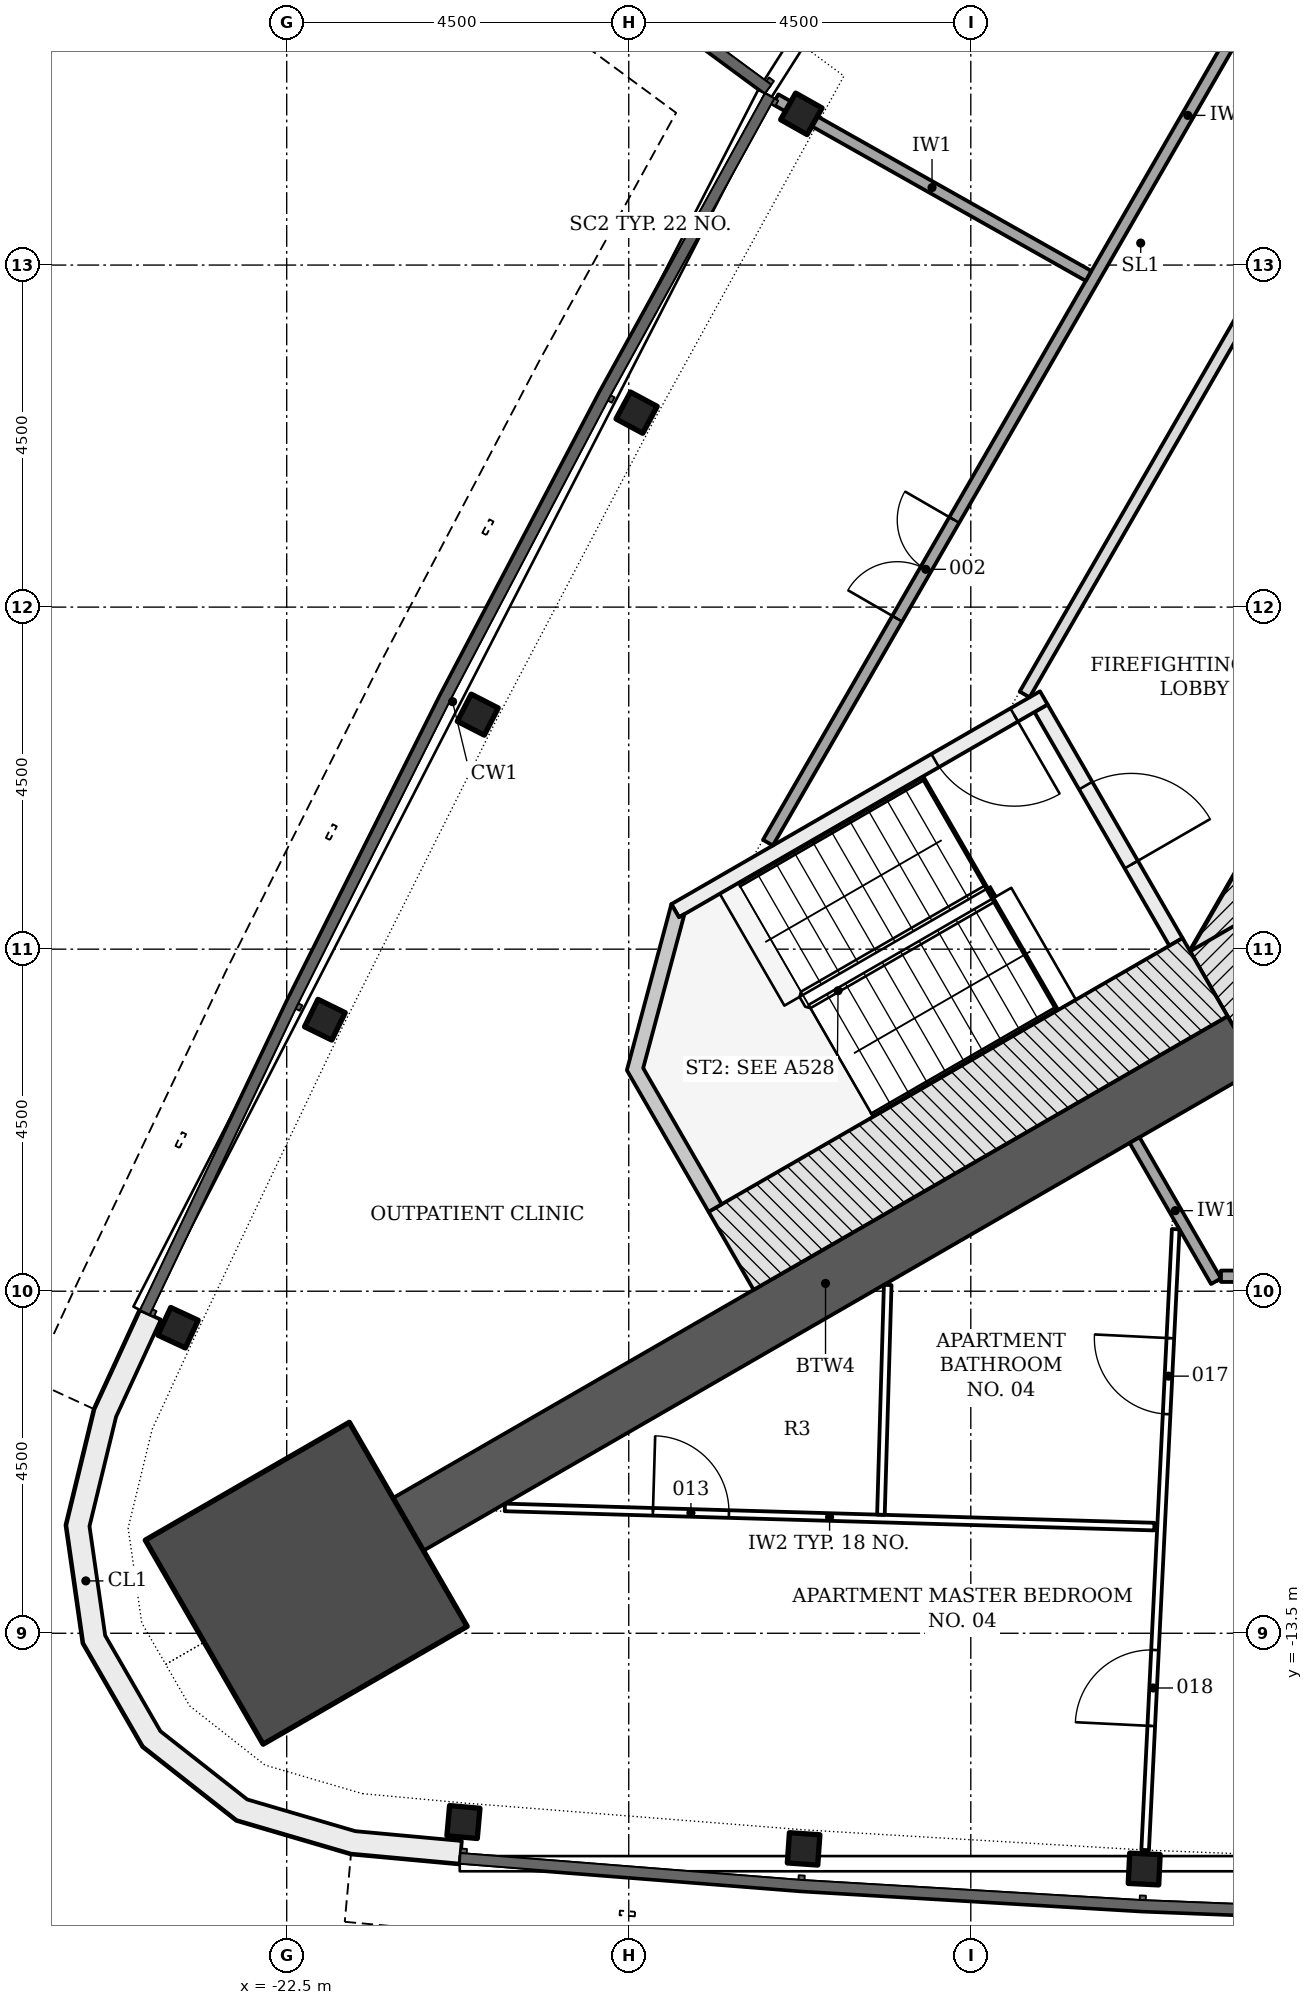
"""IFC4 building model, lengths in metres.
Left out: names, types, materials, properties, quantities, classifications, styles, units other than length and angle.
Written with IfcOpenShell. Run it as: python <this file> out.ifc"""

import sys

from ifc_helpers import new_model, si_unit, direction, frame, frame_2d, origin, origin_2d, place, context, subcontext, project, spatial, polyline, rectangle, i_section, outline, extrude, element, fill, save


model = new_model("IFC4")
c1 = context("Model", 3, precision=1e-05, world=origin(), true_north=direction((0.0, 1.0)))
c2 = subcontext(c1, "Body", "Model", "MODEL_VIEW")
j1 = project(units=[si_unit("LENGTHUNIT", "METRE"), si_unit("PLANEANGLEUNIT", "RADIAN")], contexts=[c1])
p1 = place(None, origin())
s1 = spatial("IfcSite", under=j1, at=p1, CompositionType="ELEMENT")
p2 = place(p1, origin())
s2 = spatial("IfcBuilding", under=s1, at=p2, CompositionType="ELEMENT")
p3 = place(p2, frame((0.0, 0.0, 91.5)))
s3 = spatial("IfcBuildingStorey", under=s2, at=p3, CompositionType="ELEMENT", Elevation=91.5)
p4 = place(p3, frame((-1.083, 11.281, -0.2), z_axis=(0.0, 0.0, 1.0), x_axis=(-0.500001446645, -0.866024568562, 0.0)))
e1 = element("IfcWall", 1, at=p4, inside=s3, PredefinedType="SHEAR", context=c2, shape_type="SweptSolid", body=[
    extrude(rectangle(XDim=18.458, YDim=0.7, at=frame_2d((9.229, 0.0))), origin(), (0.0, 0.0, 1.0), 3.6),
])
p5 = place(p4, frame((8.979, 0.0, 0.2)))
e2 = element("IfcOpeningElement", 2, at=p5, cuts=e1, PredefinedType="OPENING", context=c2, shape_type="SweptSolid", body=[
    extrude(rectangle(XDim=1.2, YDim=2.1, at=frame_2d((0.6, 1.05))), frame((0.0, 0.36, 0.0), z_axis=(0.0, -1.0, 0.0), x_axis=(1.0, 0.0, 0.0)), (0.0, 0.0, 1.0), 0.72),
])
p6 = place(p4, frame((11.029, 0.0, 0.2)))
e3 = element("IfcOpeningElement", 3, at=p6, cuts=e1, PredefinedType="OPENING", context=c2, shape_type="SweptSolid", body=[
    extrude(rectangle(XDim=1.2, YDim=2.1, at=frame_2d((0.6, 1.05))), frame((0.0, 0.36, 0.0), z_axis=(0.0, -1.0, 0.0), x_axis=(1.0, 0.0, 0.0)), (0.0, 0.0, 1.0), 0.72),
])
p7 = place(p3, frame((-10.311, -4.353, -0.2), z_axis=(0.0, 0.0, 1.0), x_axis=(0.500042739161, -0.866000726912, 0.0)))
e4 = element("IfcWall", 4, at=p7, inside=s3, PredefinedType="SHEAR", context=c2, shape_type="SweptSolid", body=[
    extrude(rectangle(XDim=2.771, YDim=0.7, at=frame_2d((1.386, 0.0))), origin(), (0.0, 0.0, 1.0), 3.6),
])
p8 = place(p3, frame((-9.922, -5.728, -0.2), z_axis=(0.0, 0.0, 1.0), x_axis=(-0.866029086277, -0.499993621681, 0.0)))
e5 = element("IfcWall", 5, at=p8, inside=s3, PredefinedType="SHEAR", context=c2, shape_type="SweptSolid", body=[
    extrude(rectangle(XDim=12.677, YDim=0.8, at=frame_2d((6.339, 0.0))), origin(), (0.0, 0.0, 1.0), 3.6),
])
p9 = place(p3, frame((-22.243, -12.842, -0.2), z_axis=(0.0, 0.0, 1.0), x_axis=(-0.866025403784, -0.5, 0.0)))
e6 = element("IfcColumn", 6, at=p9, inside=s3, PredefinedType="COLUMN", context=c2, shape_type="SweptSolid", body=[
    extrude(rectangle(XDim=3.1, YDim=3.1, at=origin_2d()), origin(), (0.0, 0.0, 1.0), 3.6),
])
for number, where, z_axis, x_axis in (
    (7, (-15.729, 6.49, -0.2), (0.0, 0.0, 1.0), (-0.491, -0.871, 0.0)),
    (8, (-17.897, 2.558, -0.2), (0.0, 0.0, 1.0), (-0.474, -0.88, 0.0)),
    (9, (-19.986, -1.415, -0.2), (0.0, 0.0, 1.0), (-0.457, -0.89, 0.0)),
    (10, (-21.998, -5.428, -0.2), (0.0, 0.0, 1.0), (-0.439, -0.898, 0.0)),
    (11, (-23.929, -9.48, -0.2), (0.0, 0.0, 1.0), (-0.421, -0.907, 0.0)),
    (12, (-20.175, -15.983, -0.2), (0.0, 0.0, 1.0), (0.996, -0.088, 0.0)),
    (13, (-15.7, -16.336, -0.2), (0.0, 0.0, 1.0), (0.998, -0.069, 0.0)),
    (14, (-11.219, -16.601, -0.2), (0.0, 0.0, 1.0), (0.999, -0.049, 0.0)),
):
    element("IfcColumn", number, at=place(p3, frame(where, z_axis=z_axis, x_axis=x_axis)), inside=s3, PredefinedType="COLUMN", context=c2, shape_type="SweptSolid", body=[
        extrude(i_section(OverallWidth=0.401, OverallDepth=0.399, WebThickness=0.025, FlangeThickness=0.04, FilletRadius=0.015, at=origin_2d()), origin(), (0.0, 0.0, 1.0), 3.6),
    ])
p10 = place(p3, origin())
e15 = element("IfcWall", 15, at=p10, inside=s3, PredefinedType="NOTDEFINED", context=c2, shape_type="SweptSolid", body=[
    extrude(outline(polyline([(-24.428, -9.249), (-25.03, -10.553), (-25.4, -12.077), (-25.177, -13.63), (-24.392, -14.989), (-23.159, -15.958), (-21.654, -16.4), (-20.224, -16.531), (-20.196, -16.232), (-21.597, -16.104), (-23.019, -15.687), (-24.161, -14.789), (-24.888, -13.53), (-25.094, -12.092), (-24.745, -10.652), (-24.156, -9.374), (-24.428, -9.249)])), origin(), (0.0, 0.0, 1.0), 3.3),
])
p11 = place(p3, frame((-12.576, -1.331, -0.2), z_axis=(0.0, 0.0, 1.0), x_axis=(0.499970499736, -0.8660424351, 0.0)))
e16 = element("IfcWall", 16, at=p11, inside=s3, PredefinedType="SHEAR", context=c2, shape_type="SweptSolid", body=[
    extrude(rectangle(XDim=3.55, YDim=0.2, at=frame_2d((1.775, 0.0))), origin(), (0.0, 0.0, 1.0), 3.6),
])
p12 = place(p11, frame((1.175, 0.0, 0.2)))
e17 = element("IfcOpeningElement", 17, at=p12, cuts=e16, PredefinedType="OPENING", context=c2, shape_type="SweptSolid", body=[
    extrude(rectangle(XDim=1.2, YDim=2.1, at=frame_2d((0.6, 1.05))), frame((0.0, 0.11, 0.0), z_axis=(0.0, -1.0, 0.0), x_axis=(1.0, 0.0, 0.0)), (0.0, 0.0, 1.0), 0.22),
])
p13 = place(p3, frame((-12.539, -1.194, -0.2), z_axis=(0.0, 0.0, 1.0), x_axis=(-0.866045472092, -0.499965239061, 0.0)))
e18 = element("IfcWall", 18, at=p13, inside=s3, PredefinedType="SHEAR", context=c2, shape_type="SweptSolid", body=[
    extrude(rectangle(XDim=5.6, YDim=0.2, at=frame_2d((2.8, 0.0))), origin(), (0.0, 0.0, 1.0), 3.6),
])
p14 = place(p13, frame((0.45, 0.0, 0.2)))
e19 = element("IfcOpeningElement", 19, at=p14, cuts=e18, PredefinedType="OPENING", context=c2, shape_type="SweptSolid", body=[
    extrude(rectangle(XDim=1.2, YDim=2.1, at=frame_2d((0.6, 1.05))), frame((0.0, 0.11, 0.0), z_axis=(0.0, -1.0, 0.0), x_axis=(1.0, 0.0, 0.0)), (0.0, 0.0, 1.0), 0.22),
])
p15 = place(p3, frame((-10.418, -4.868, -0.2), z_axis=(0.0, 0.0, 1.0), x_axis=(-0.866018442252, -0.500012057535, 0.0)))
e20 = element("IfcWall", 20, at=p15, inside=s3, PredefinedType="SHEAR", context=c2, shape_type="SweptSolid", body=[
    extrude(rectangle(XDim=7.2, YDim=1.186, at=frame_2d((3.6, 0.0))), origin(), (0.0, 0.0, 1.0), 3.6),
])
p16 = place(p3, frame((0.0, 0.0, -0.2)))
e21 = element("IfcWall", 21, at=p16, inside=s3, PredefinedType="SHEAR", context=c2, shape_type="SweptSolid", body=[
    extrude(outline(polyline([(-17.439, -3.907), (-18.025, -6.093), (-16.95, -7.955), (-16.777, -7.855), (-17.81, -6.065), (-17.267, -4.039), (-17.339, -4.081), (-17.339, -4.081), (-17.339, -4.081), (-17.339, -4.081), (-17.339, -4.081), (-17.339, -4.081), (-17.339, -4.081), (-17.339, -4.081), (-17.339, -4.081), (-17.339, -4.081), (-17.339, -4.081), (-17.339, -4.081), (-17.339, -4.081), (-17.339, -4.081), (-17.339, -4.081), (-17.339, -4.081), (-17.339, -4.081), (-17.439, -3.907)])), origin(), (0.0, 0.0, 1.0), 3.6),
])
p17 = place(p3, frame((-16.169, -3.099, 0.0), z_axis=(0.0, 0.0, 1.0), x_axis=(0.499999805269, 0.866025516212, 0.0)))
e22 = element("IfcWall", 22, at=p17, inside=s3, PredefinedType="PARTITIONING", context=c2, shape_type="SweptSolid", body=[
    extrude(rectangle(XDim=22.097, YDim=0.15, at=frame_2d((11.049, 0.0))), origin(), (0.0, 0.0, 1.0), 2.778),
])
p18 = place(p17, frame((12.221, 0.0, 0.0)))
e23 = element("IfcOpeningElement", 23, at=p18, cuts=e22, PredefinedType="OPENING", context=c2, shape_type="SweptSolid", body=[
    extrude(rectangle(XDim=1.5, YDim=2.1, at=frame_2d((0.75, 1.05))), frame((0.0, 0.085, 0.0), z_axis=(0.0, -1.0, 0.0), x_axis=(1.0, 0.0, 0.0)), (0.0, 0.0, 1.0), 0.17),
])
p19 = place(p17, frame((3.403, 0.0, 0.0)))
e24 = element("IfcOpeningElement", 24, at=p19, cuts=e22, PredefinedType="OPENING", context=c2, shape_type="SweptSolid", body=[
    extrude(rectangle(XDim=1.5, YDim=2.1, at=frame_2d((0.75, 1.05))), frame((0.0, 0.085, 0.0), z_axis=(0.0, -1.0, 0.0), x_axis=(1.0, 0.0, 0.0)), (0.0, 0.0, 1.0), 0.17),
])
p20 = place(p3, frame((-4.407, 13.374, 0.0), z_axis=(0.0, 0.0, 1.0), x_axis=(-0.499997181693, -0.866027030928, 0.0)))
e25 = element("IfcWall", 25, at=p20, inside=s3, PredefinedType="PARTITIONING", context=c2, shape_type="SweptSolid", body=[
    extrude(rectangle(XDim=16.77, YDim=0.15, at=frame_2d((8.385, 0.0))), origin(), (0.0, 0.0, 1.0), 2.778),
])
p21 = place(p20, frame((8.879, 0.0, 0.0)))
e26 = element("IfcOpeningElement", 26, at=p21, cuts=e25, PredefinedType="OPENING", context=c2, shape_type="SweptSolid", body=[
    extrude(rectangle(XDim=1.0, YDim=2.1, at=frame_2d((0.5, 1.05))), frame((0.0, 0.085, 0.0), z_axis=(0.0, -1.0, 0.0), x_axis=(1.0, 0.0, 0.0)), (0.0, 0.0, 1.0), 0.17),
])
p22 = place(p3, frame((-11.345, -7.012, 0.0), z_axis=(0.0, 0.0, 1.0), x_axis=(0.499998569178, -0.866026229868, 0.0)))
e27 = element("IfcWall", 27, at=p22, inside=s3, PredefinedType="PARTITIONING", context=c2, shape_type="SweptSolid", body=[
    extrude(rectangle(XDim=2.143, YDim=0.15, at=frame_2d((1.072, 0.0))), origin(), (0.0, 0.0, 1.0), 2.778),
])
p23 = place(p3, frame((-10.209, -8.803, 0.0), z_axis=(0.0, 0.0, 1.0), x_axis=(1.0, 0.0, 0.0)))
e28 = element("IfcWall", 28, at=p23, inside=s3, PredefinedType="PARTITIONING", context=c2, shape_type="SweptSolid", body=[
    extrude(rectangle(XDim=0.83, YDim=0.15, at=frame_2d((0.415, 0.0))), origin(), (0.0, 0.0, 1.0), 3.4),
])
p24 = place(p3, frame((-16.069, 6.681, 0.0), z_axis=(0.0, 0.0, 1.0), x_axis=(0.87091272742, -0.49143770838, 0.0)))
e29 = element("IfcWall", 29, at=p24, inside=s3, PredefinedType="PARTITIONING", context=c2, shape_type="SweptSolid", body=[
    extrude(rectangle(XDim=4.728, YDim=0.15, at=frame_2d((2.364, 0.0))), origin(), (0.0, 0.0, 1.0), 2.778),
])
p25 = place(p3, frame((-19.63, -11.844, 0.0), z_axis=(0.0, 0.0, 1.0), x_axis=(0.999564712957, -0.02950228145, 0.0)))
e30 = element("IfcWall", 30, at=p25, inside=s3, PredefinedType="PARTITIONING", context=c2, shape_type="SweptSolid", body=[
    extrude(rectangle(XDim=8.548, YDim=0.1, at=frame_2d((4.274, 0.0))), origin(), (0.0, 0.0, 1.0), 2.778),
])
p26 = place(p25, frame((1.949, 0.0, 0.0)))
e31 = element("IfcOpeningElement", 31, at=p26, cuts=e30, PredefinedType="OPENING", context=c2, shape_type="SweptSolid", body=[
    extrude(rectangle(XDim=1.0, YDim=2.1, at=frame_2d((0.5, 1.05))), frame((0.0, 0.06, 0.0), z_axis=(0.0, -1.0, 0.0), x_axis=(1.0, 0.0, 0.0)), (0.0, 0.0, 1.0), 0.12),
])
p27 = place(p3, frame((-11.206, -16.352, 0.0), z_axis=(0.0, 0.0, 1.0), x_axis=(0.049170759729, 0.998790386612, 0.0)))
e32 = element("IfcWall", 32, at=p27, inside=s3, PredefinedType="PARTITIONING", context=c2, shape_type="SweptSolid", body=[
    extrude(rectangle(XDim=8.178, YDim=0.1, at=frame_2d((4.089, 0.0))), origin(), (0.0, 0.0, 1.0), 2.778),
])
p28 = place(p27, frame((5.742, 0.0, 0.0)))
e33 = element("IfcOpeningElement", 33, at=p28, cuts=e32, PredefinedType="OPENING", context=c2, shape_type="SweptSolid", body=[
    extrude(rectangle(XDim=1.0, YDim=2.1, at=frame_2d((0.5, 1.05))), frame((0.0, 0.06, 0.0), z_axis=(0.0, -1.0, 0.0), x_axis=(1.0, 0.0, 0.0)), (0.0, 0.0, 1.0), 0.12),
])
p29 = place(p27, frame((1.635, 0.0, 0.0)))
e34 = element("IfcOpeningElement", 34, at=p29, cuts=e32, PredefinedType="OPENING", context=c2, shape_type="SweptSolid", body=[
    extrude(rectangle(XDim=1.0, YDim=2.1, at=frame_2d((0.5, 1.05))), frame((0.0, 0.06, 0.0), z_axis=(0.0, -1.0, 0.0), x_axis=(1.0, 0.0, 0.0)), (0.0, 0.0, 1.0), 0.12),
])
p30 = place(p3, frame((-14.682, -11.94, 0.0), z_axis=(0.0, 0.0, 1.0), x_axis=(0.029546132361, 0.999563417729, 0.0)))
e35 = element("IfcWall", 35, at=p30, inside=s3, PredefinedType="PARTITIONING", context=c2, shape_type="SweptSolid", body=[
    extrude(rectangle(XDim=3.024, YDim=0.1, at=frame_2d((1.512, 0.0))), origin(), (0.0, 0.0, 1.0), 3.4),
])
p31 = place(p12, origin())
e36 = element("IfcDoor", 36, at=p31, inside=s3, OperationType="SINGLE_SWING_RIGHT", PredefinedType="DOOR", context=c2, shape_type="SweptSolid", body=[
    extrude(rectangle(XDim=1.2, YDim=2.1, at=frame_2d((0.6, 1.05))), frame((0.0, 0.025, 0.0), z_axis=(0.0, -1.0, 0.0), x_axis=(1.0, 0.0, 0.0)), (0.0, 0.0, 1.0), 0.05),
])
fill(e17, e36)
p32 = place(p14, origin())
e37 = element("IfcDoor", 37, at=p32, inside=s3, OperationType="SINGLE_SWING_LEFT", PredefinedType="DOOR", context=c2, shape_type="SweptSolid", body=[
    extrude(rectangle(XDim=1.2, YDim=2.1, at=frame_2d((0.6, 1.05))), frame((0.0, 0.025, 0.0), z_axis=(0.0, -1.0, 0.0), x_axis=(1.0, 0.0, 0.0)), (0.0, 0.0, 1.0), 0.05),
])
fill(e19, e37)
p33 = place(p19, origin())
e38 = element("IfcDoor", 38, at=p33, inside=s3, OperationType="DOUBLE_DOOR_SINGLE_SWING", PredefinedType="DOOR", context=c2, shape_type="SweptSolid", body=[
    extrude(rectangle(XDim=1.5, YDim=2.1, at=frame_2d((0.75, 1.05))), frame((0.0, 0.025, 0.0), z_axis=(0.0, -1.0, 0.0), x_axis=(1.0, 0.0, 0.0)), (0.0, 0.0, 1.0), 0.05),
])
fill(e24, e38)
p34 = place(p26, origin())
e39 = element("IfcDoor", 39, at=p34, inside=s3, OperationType="SINGLE_SWING_LEFT", PredefinedType="DOOR", context=c2, shape_type="SweptSolid", body=[
    extrude(rectangle(XDim=1.0, YDim=2.1, at=frame_2d((0.5, 1.05))), frame((0.0, 0.025, 0.0), z_axis=(0.0, -1.0, 0.0), x_axis=(1.0, 0.0, 0.0)), (0.0, 0.0, 1.0), 0.05),
])
fill(e31, e39)
p35 = place(p28, origin())
e40 = element("IfcDoor", 40, at=p35, inside=s3, OperationType="SINGLE_SWING_RIGHT", PredefinedType="DOOR", context=c2, shape_type="SweptSolid", body=[
    extrude(rectangle(XDim=1.0, YDim=2.1, at=frame_2d((0.5, 1.05))), frame((0.0, 0.025, 0.0), z_axis=(0.0, -1.0, 0.0), x_axis=(1.0, 0.0, 0.0)), (0.0, 0.0, 1.0), 0.05),
])
fill(e33, e40)
p36 = place(p29, origin())
e41 = element("IfcDoor", 41, at=p36, inside=s3, OperationType="SINGLE_SWING_LEFT", PredefinedType="DOOR", context=c2, shape_type="SweptSolid", body=[
    extrude(rectangle(XDim=1.0, YDim=2.1, at=frame_2d((0.5, 1.05))), frame((0.0, 0.025, 0.0), z_axis=(0.0, -1.0, 0.0), x_axis=(1.0, 0.0, 0.0)), (0.0, 0.0, 1.0), 0.05),
])
fill(e34, e41)
save(model, sys.argv[1])
